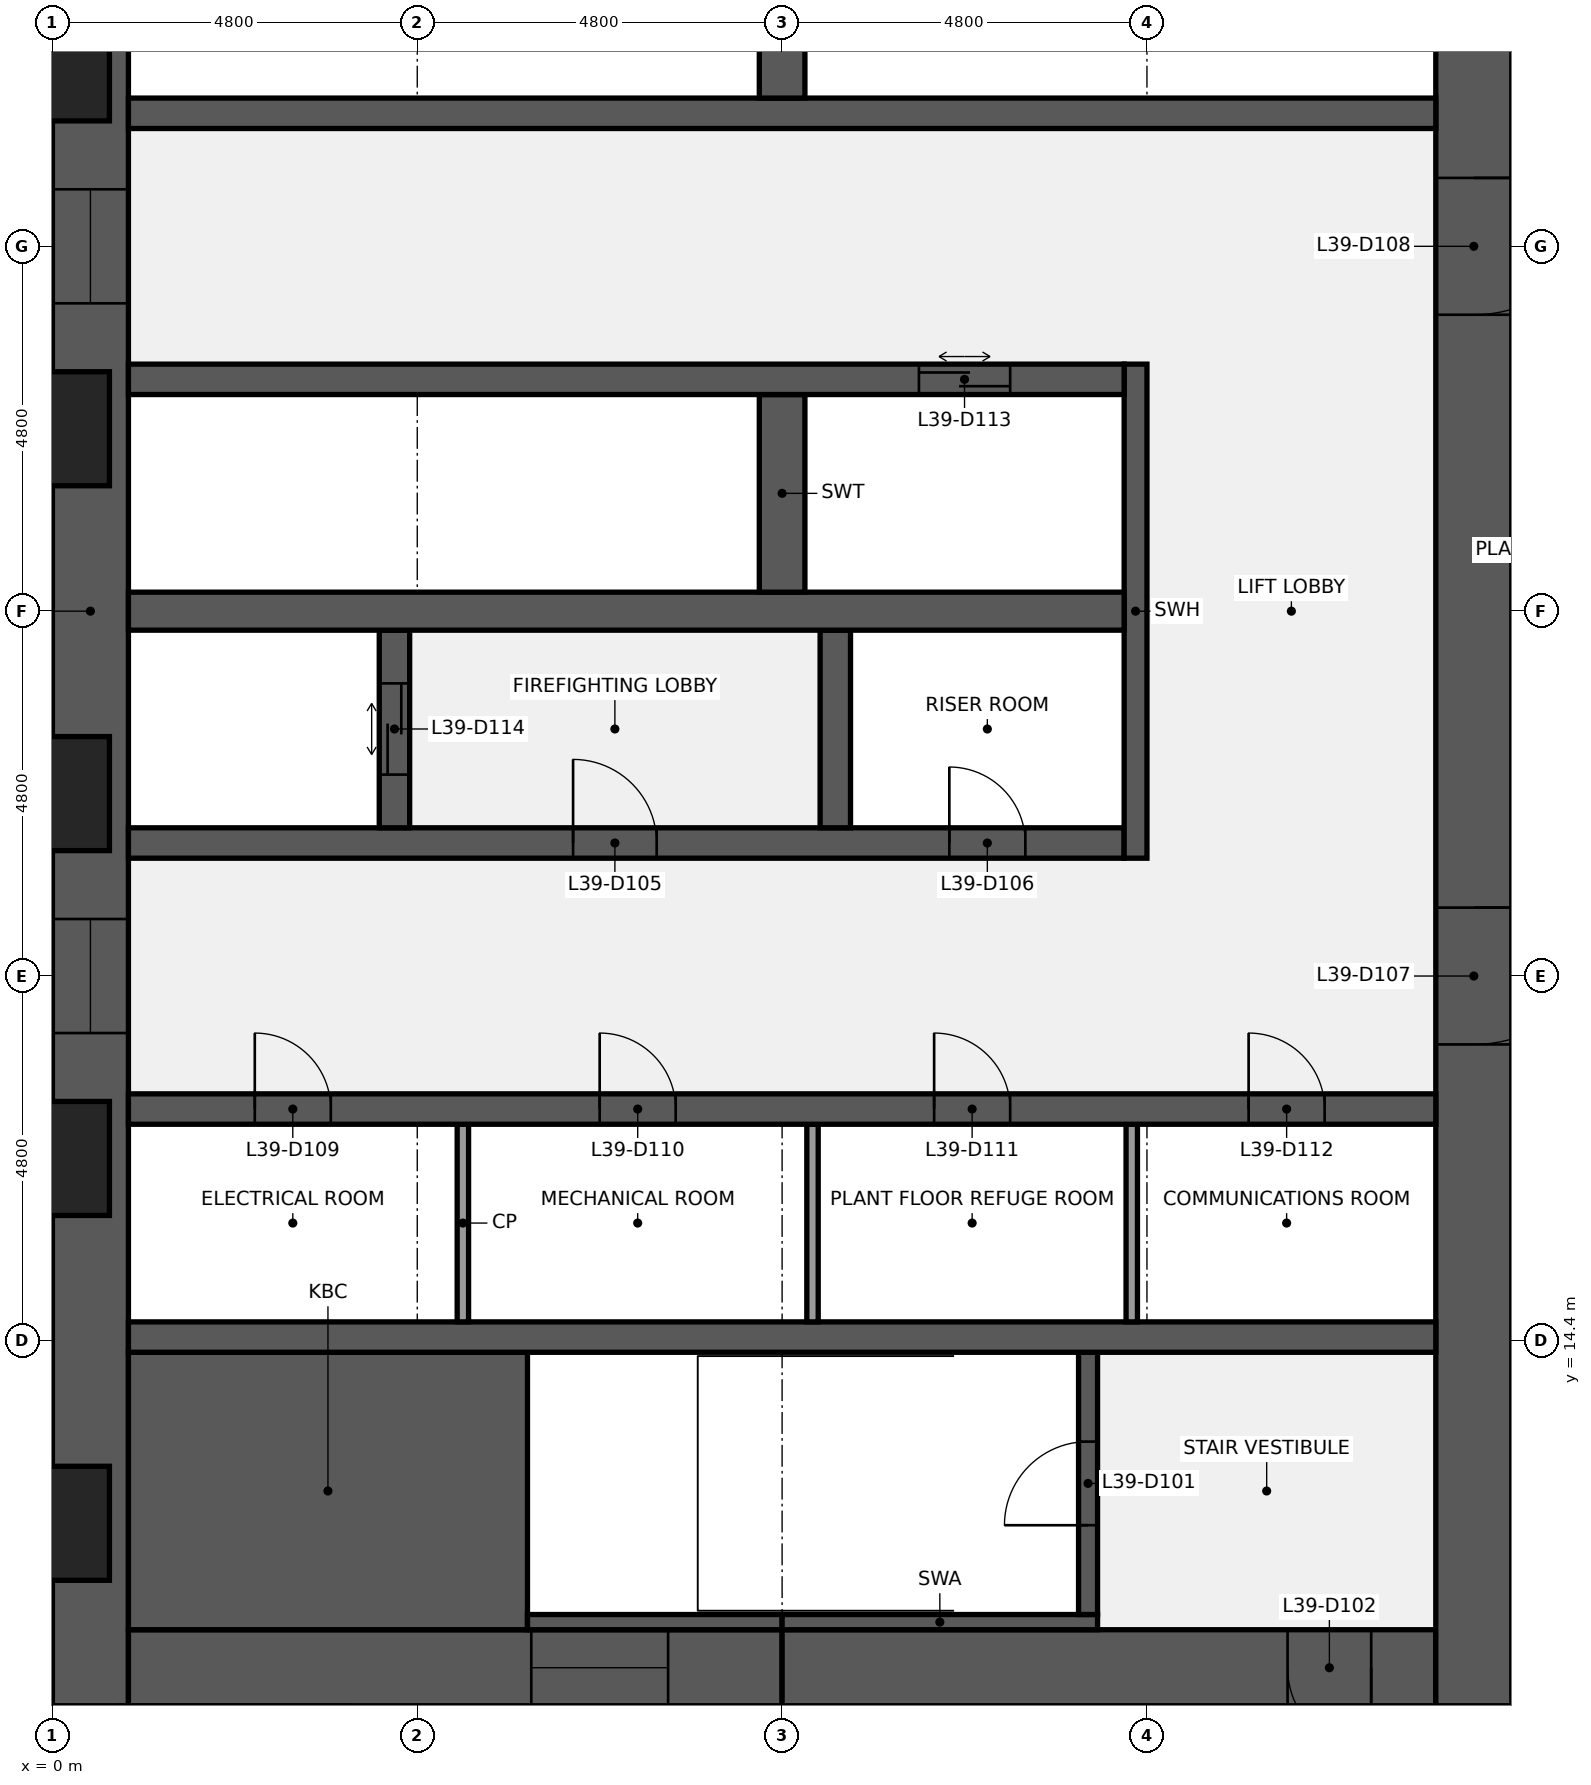
"""IFC4 building model, lengths in metres.
Left out: names, types, materials, properties, quantities, classifications, styles, units other than length and angle.
Written with IfcOpenShell. Run it as: python <this file> out.ifc"""

import sys

from ifc_helpers import new_model, si_unit, direction, frame, frame_2d, origin, place, context, subcontext, project, spatial, rectangle, extrude, element, fill, save


model = new_model("IFC4")
c1 = context("Model", 3, precision=1e-05, world=origin(), true_north=direction((0.0, 1.0)))
c2 = subcontext(c1, "Body", "Model", "MODEL_VIEW")
j1 = project(units=[si_unit("LENGTHUNIT", "METRE"), si_unit("PLANEANGLEUNIT", "RADIAN")], contexts=[c1])
p1 = place(None, origin())
s1 = spatial("IfcSite", under=j1, at=p1, CompositionType="ELEMENT")
p2 = place(p1, origin())
s2 = spatial("IfcBuilding", under=s1, at=p2, CompositionType="ELEMENT")
p3 = place(p2, frame((0.0, 0.0, 176.1)))
s3 = spatial("IfcBuildingStorey", under=s2, at=p3, CompositionType="ELEMENT", Elevation=176.1)
p4 = place(p3, frame((0.5, 9.6, 0.0), z_axis=(0.0, 0.0, 1.0), x_axis=(0.0, 1.0, 0.0)))
e1 = element("IfcWall", 1, at=p4, inside=s3, PredefinedType="SHEAR", context=c2, shape_type="SweptSolid", body=[
    extrude(rectangle(XDim=28.8, YDim=1.0, at=frame_2d((14.4, 0.0))), origin(), (0.0, 0.0, 1.0), 4.1),
])
p5 = place(p4, frame((8.85, 0.0, 0.9)))
e2 = element("IfcOpeningElement", 2, at=p5, cuts=e1, PredefinedType="OPENING", context=c2, shape_type="SweptSolid", body=[
    extrude(rectangle(XDim=1.5, YDim=1.5, at=frame_2d((0.75, 0.75))), frame((0.0, 0.51, 0.0), z_axis=(0.0, -1.0, 0.0), x_axis=(1.0, 0.0, 0.0)), (0.0, 0.0, 1.0), 1.02),
])
p6 = place(p4, frame((18.45, 0.0, 0.9)))
e3 = element("IfcOpeningElement", 3, at=p6, cuts=e1, PredefinedType="OPENING", context=c2, shape_type="SweptSolid", body=[
    extrude(rectangle(XDim=1.5, YDim=1.5, at=frame_2d((0.75, 0.75))), frame((0.0, 0.51, 0.0), z_axis=(0.0, -1.0, 0.0), x_axis=(1.0, 0.0, 0.0)), (0.0, 0.0, 1.0), 1.02),
])
p7 = place(p3, frame((9.6, 10.1, 0.0), z_axis=(0.0, 0.0, 1.0), x_axis=(-1.0, 0.0, 0.0)))
e4 = element("IfcWall", 4, at=p7, inside=s3, PredefinedType="SHEAR", context=c2, shape_type="SweptSolid", body=[
    extrude(rectangle(XDim=8.6, YDim=1.0, at=frame_2d((4.3, 0.0))), origin(), (0.0, 0.0, 1.0), 4.1),
])
p8 = place(p7, frame((1.5, 0.0, 0.9)))
e5 = element("IfcOpeningElement", 5, at=p8, cuts=e4, PredefinedType="OPENING", context=c2, shape_type="SweptSolid", body=[
    extrude(rectangle(XDim=1.8, YDim=1.5, at=frame_2d((0.9, 0.75))), frame((0.0, 0.51, 0.0), z_axis=(0.0, -1.0, 0.0), x_axis=(1.0, 0.0, 0.0)), (0.0, 0.0, 1.0), 1.02),
])
p9 = place(p3, frame((18.2, 10.1, 0.0), z_axis=(0.0, 0.0, 1.0), x_axis=(-1.0, 0.0, 0.0)))
e6 = element("IfcWall", 6, at=p9, inside=s3, PredefinedType="SHEAR", context=c2, shape_type="SweptSolid", body=[
    extrude(rectangle(XDim=8.6, YDim=1.0, at=frame_2d((4.3, 0.0))), origin(), (0.0, 0.0, 1.0), 4.1),
])
p10 = place(p9, frame((0.85, 0.0, 0.0)))
e7 = element("IfcOpeningElement", 7, at=p10, cuts=e6, PredefinedType="OPENING", context=c2, shape_type="SweptSolid", body=[
    extrude(rectangle(XDim=1.1, YDim=2.1, at=frame_2d((0.55, 1.05))), frame((0.0, 0.51, 0.0), z_axis=(0.0, -1.0, 0.0), x_axis=(1.0, 0.0, 0.0)), (0.0, 0.0, 1.0), 1.02),
])
p11 = place(p3, frame((18.7, 38.4, 0.0), z_axis=(0.0, 0.0, 1.0), x_axis=(0.0, -1.0, 0.0)))
e8 = element("IfcWall", 8, at=p11, inside=s3, PredefinedType="SHEAR", context=c2, shape_type="SweptSolid", body=[
    extrude(rectangle(XDim=28.8, YDim=1.0, at=frame_2d((14.4, 0.0))), origin(), (0.0, 0.0, 1.0), 4.1),
])
p12 = place(p11, frame((18.3, 0.0, 0.0)))
e9 = element("IfcOpeningElement", 9, at=p12, cuts=e8, PredefinedType="OPENING", context=c2, shape_type="SweptSolid", body=[
    extrude(rectangle(XDim=1.8, YDim=2.1, at=frame_2d((0.9, 1.05))), frame((0.0, 0.51, 0.0), z_axis=(0.0, -1.0, 0.0), x_axis=(1.0, 0.0, 0.0)), (0.0, 0.0, 1.0), 1.02),
])
p13 = place(p11, frame((8.7, 0.0, 0.0)))
e10 = element("IfcOpeningElement", 10, at=p13, cuts=e8, PredefinedType="OPENING", context=c2, shape_type="SweptSolid", body=[
    extrude(rectangle(XDim=1.8, YDim=2.1, at=frame_2d((0.9, 1.05))), frame((0.0, 0.51, 0.0), z_axis=(0.0, -1.0, 0.0), x_axis=(1.0, 0.0, 0.0)), (0.0, 0.0, 1.0), 1.02),
])
p14 = place(p3, frame((1.0, 12.425, 0.0), z_axis=(0.0, 0.0, 1.0), x_axis=(1.0, 0.0, 0.0)))
e11 = element("IfcWall", 11, at=p14, inside=s3, PredefinedType="SHEAR", context=c2, shape_type="SweptSolid", body=[
    extrude(rectangle(XDim=5.25, YDim=3.65, at=frame_2d((2.625, 0.0))), origin(), (0.0, 0.0, 1.0), 4.1),
])
p15 = place(p3, frame((6.25, 10.7, 0.0), z_axis=(0.0, 0.0, 1.0), x_axis=(1.0, 0.0, 0.0)))
e12 = element("IfcWall", 12, at=p15, inside=s3, PredefinedType="SHEAR", context=c2, shape_type="SweptSolid", body=[
    extrude(rectangle(XDim=3.35, YDim=0.2, at=frame_2d((1.675, 0.0))), origin(), (0.0, 0.0, 1.0), 4.1),
])
p16 = place(p3, frame((9.6, 10.7, 0.0), z_axis=(0.0, 0.0, 1.0), x_axis=(1.0, 0.0, 0.0)))
e13 = element("IfcWall", 13, at=p16, inside=s3, PredefinedType="SHEAR", context=c2, shape_type="SweptSolid", body=[
    extrude(rectangle(XDim=4.15, YDim=0.2, at=frame_2d((2.075, 0.0))), origin(), (0.0, 0.0, 1.0), 4.1),
])
p17 = place(p3, frame((13.625, 10.8, 0.0), z_axis=(0.0, 0.0, 1.0), x_axis=(0.0, 1.0, 0.0)))
e14 = element("IfcWall", 14, at=p17, inside=s3, PredefinedType="SHEAR", context=c2, shape_type="SweptSolid", body=[
    extrude(rectangle(XDim=3.45, YDim=0.25, at=frame_2d((1.725, 0.0))), origin(), (0.0, 0.0, 1.0), 4.1),
])
p18 = place(p17, frame((1.175, 0.0, 0.0)))
e15 = element("IfcOpeningElement", 15, at=p18, cuts=e14, PredefinedType="OPENING", context=c2, shape_type="SweptSolid", body=[
    extrude(rectangle(XDim=1.1, YDim=2.1, at=frame_2d((0.55, 1.05))), frame((0.0, 0.135, 0.0), z_axis=(0.0, -1.0, 0.0), x_axis=(1.0, 0.0, 0.0)), (0.0, 0.0, 1.0), 0.27),
])
p19 = place(p3, frame((1.0, 14.45, 0.0), z_axis=(0.0, 0.0, 1.0), x_axis=(1.0, 0.0, 0.0)))
e16 = element("IfcWall", 16, at=p19, inside=s3, PredefinedType="SHEAR", context=c2, shape_type="SweptSolid", body=[
    extrude(rectangle(XDim=17.2, YDim=0.4, at=frame_2d((8.6, 0.0))), origin(), (0.0, 0.0, 1.0), 4.1),
])
for number, where, z_axis, x_axis in (
    (17, (5.4, 14.65, 0.0), (0.0, 0.0, 1.0), (0.0, 1.0, 0.0)),
    (18, (10.0, 14.65, 0.0), (0.0, 0.0, 1.0), (0.0, 1.0, 0.0)),
    (19, (14.2, 14.65, 0.0), (0.0, 0.0, 1.0), (0.0, 1.0, 0.0)),
):
    element("IfcWall", number, at=place(p3, frame(where, z_axis=z_axis, x_axis=x_axis)), inside=s3, PredefinedType="PARTITIONING", context=c2, shape_type="SweptSolid", body=[
        extrude(rectangle(XDim=2.6, YDim=0.15, at=frame_2d((1.3, 0.0))), origin(), (0.0, 0.0, 1.0), 4.1),
    ])
p20 = place(p3, frame((1.0, 17.45, 0.0), z_axis=(0.0, 0.0, 1.0), x_axis=(1.0, 0.0, 0.0)))
e20 = element("IfcWall", 20, at=p20, inside=s3, PredefinedType="SHEAR", context=c2, shape_type="SweptSolid", body=[
    extrude(rectangle(XDim=17.2, YDim=0.4, at=frame_2d((8.6, 0.0))), origin(), (0.0, 0.0, 1.0), 4.1),
])
p21 = place(p20, frame((1.663, 0.0, 0.0)))
e21 = element("IfcOpeningElement", 21, at=p21, cuts=e20, PredefinedType="OPENING", context=c2, shape_type="SweptSolid", body=[
    extrude(rectangle(XDim=1.0, YDim=2.1, at=frame_2d((0.5, 1.05))), frame((0.0, 0.21, 0.0), z_axis=(0.0, -1.0, 0.0), x_axis=(1.0, 0.0, 0.0)), (0.0, 0.0, 1.0), 0.42),
])
p22 = place(p20, frame((6.2, 0.0, 0.0)))
e22 = element("IfcOpeningElement", 22, at=p22, cuts=e20, PredefinedType="OPENING", context=c2, shape_type="SweptSolid", body=[
    extrude(rectangle(XDim=1.0, YDim=2.1, at=frame_2d((0.5, 1.05))), frame((0.0, 0.21, 0.0), z_axis=(0.0, -1.0, 0.0), x_axis=(1.0, 0.0, 0.0)), (0.0, 0.0, 1.0), 0.42),
])
p23 = place(p20, frame((10.6, 0.0, 0.0)))
e23 = element("IfcOpeningElement", 23, at=p23, cuts=e20, PredefinedType="OPENING", context=c2, shape_type="SweptSolid", body=[
    extrude(rectangle(XDim=1.0, YDim=2.1, at=frame_2d((0.5, 1.05))), frame((0.0, 0.21, 0.0), z_axis=(0.0, -1.0, 0.0), x_axis=(1.0, 0.0, 0.0)), (0.0, 0.0, 1.0), 0.42),
])
p24 = place(p20, frame((14.738, 0.0, 0.0)))
e24 = element("IfcOpeningElement", 24, at=p24, cuts=e20, PredefinedType="OPENING", context=c2, shape_type="SweptSolid", body=[
    extrude(rectangle(XDim=1.0, YDim=2.1, at=frame_2d((0.5, 1.05))), frame((0.0, 0.21, 0.0), z_axis=(0.0, -1.0, 0.0), x_axis=(1.0, 0.0, 0.0)), (0.0, 0.0, 1.0), 0.42),
])
p25 = place(p3, frame((1.0, 20.95, 0.0), z_axis=(0.0, 0.0, 1.0), x_axis=(1.0, 0.0, 0.0)))
e25 = element("IfcWall", 25, at=p25, inside=s3, PredefinedType="SHEAR", context=c2, shape_type="SweptSolid", body=[
    extrude(rectangle(XDim=13.1, YDim=0.4, at=frame_2d((6.55, 0.0))), origin(), (0.0, 0.0, 1.0), 4.1),
])
p26 = place(p25, frame((5.85, 0.0, 0.0)))
e26 = element("IfcOpeningElement", 26, at=p26, cuts=e25, PredefinedType="OPENING", context=c2, shape_type="SweptSolid", body=[
    extrude(rectangle(XDim=1.1, YDim=2.1, at=frame_2d((0.55, 1.05))), frame((0.0, 0.21, 0.0), z_axis=(0.0, -1.0, 0.0), x_axis=(1.0, 0.0, 0.0)), (0.0, 0.0, 1.0), 0.42),
])
p27 = place(p25, frame((10.8, 0.0, 0.0)))
e27 = element("IfcOpeningElement", 27, at=p27, cuts=e25, PredefinedType="OPENING", context=c2, shape_type="SweptSolid", body=[
    extrude(rectangle(XDim=1.0, YDim=2.1, at=frame_2d((0.5, 1.05))), frame((0.0, 0.21, 0.0), z_axis=(0.0, -1.0, 0.0), x_axis=(1.0, 0.0, 0.0)), (0.0, 0.0, 1.0), 0.42),
])
p28 = place(p3, frame((14.25, 20.75, 0.0), z_axis=(0.0, 0.0, 1.0), x_axis=(0.0, 1.0, 0.0)))
e28 = element("IfcWall", 28, at=p28, inside=s3, PredefinedType="SHEAR", context=c2, shape_type="SweptSolid", body=[
    extrude(rectangle(XDim=6.5, YDim=0.3, at=frame_2d((3.25, 0.0))), origin(), (0.0, 0.0, 1.0), 4.1),
])
p29 = place(p3, frame((4.5, 21.15, 0.0), z_axis=(0.0, 0.0, 1.0), x_axis=(0.0, 1.0, 0.0)))
e29 = element("IfcWall", 29, at=p29, inside=s3, PredefinedType="SHEAR", context=c2, shape_type="SweptSolid", body=[
    extrude(rectangle(XDim=2.6, YDim=0.4, at=frame_2d((1.3, 0.0))), origin(), (0.0, 0.0, 1.0), 4.1),
])
p30 = place(p29, frame((0.7, 0.0, 0.0)))
e30 = element("IfcOpeningElement", 30, at=p30, cuts=e29, PredefinedType="OPENING", context=c2, shape_type="SweptSolid", body=[
    extrude(rectangle(XDim=1.2, YDim=2.1, at=frame_2d((0.6, 1.05))), frame((0.0, 0.21, 0.0), z_axis=(0.0, -1.0, 0.0), x_axis=(1.0, 0.0, 0.0)), (0.0, 0.0, 1.0), 0.42),
])
p31 = place(p3, frame((10.3, 21.15, 0.0), z_axis=(0.0, 0.0, 1.0), x_axis=(0.0, 1.0, 0.0)))
e31 = element("IfcWall", 31, at=p31, inside=s3, PredefinedType="SHEAR", context=c2, shape_type="SweptSolid", body=[
    extrude(rectangle(XDim=2.6, YDim=0.4, at=frame_2d((1.3, 0.0))), origin(), (0.0, 0.0, 1.0), 4.1),
])
p32 = place(p3, frame((1.0, 24.0, 0.0), z_axis=(0.0, 0.0, 1.0), x_axis=(1.0, 0.0, 0.0)))
e32 = element("IfcWall", 32, at=p32, inside=s3, PredefinedType="SHEAR", context=c2, shape_type="SweptSolid", body=[
    extrude(rectangle(XDim=13.1, YDim=0.5, at=frame_2d((6.55, 0.0))), origin(), (0.0, 0.0, 1.0), 4.1),
])
p33 = place(p3, frame((9.6, 24.25, 0.0), z_axis=(0.0, 0.0, 1.0), x_axis=(0.0, 1.0, 0.0)))
e33 = element("IfcWall", 33, at=p33, inside=s3, PredefinedType="SHEAR", context=c2, shape_type="SweptSolid", body=[
    extrude(rectangle(XDim=2.6, YDim=0.6, at=frame_2d((1.3, 0.0))), origin(), (0.0, 0.0, 1.0), 4.1),
])
p34 = place(p3, frame((1.0, 27.05, 0.0), z_axis=(0.0, 0.0, 1.0), x_axis=(1.0, 0.0, 0.0)))
e34 = element("IfcWall", 34, at=p34, inside=s3, PredefinedType="SHEAR", context=c2, shape_type="SweptSolid", body=[
    extrude(rectangle(XDim=13.1, YDim=0.4, at=frame_2d((6.55, 0.0))), origin(), (0.0, 0.0, 1.0), 4.1),
])
p35 = place(p34, frame((10.4, 0.0, 0.0)))
e35 = element("IfcOpeningElement", 35, at=p35, cuts=e34, PredefinedType="OPENING", context=c2, shape_type="SweptSolid", body=[
    extrude(rectangle(XDim=1.2, YDim=2.1, at=frame_2d((0.6, 1.05))), frame((0.0, 0.21, 0.0), z_axis=(0.0, -1.0, 0.0), x_axis=(1.0, 0.0, 0.0)), (0.0, 0.0, 1.0), 0.42),
])
p36 = place(p3, frame((1.0, 30.55, 0.0), z_axis=(0.0, 0.0, 1.0), x_axis=(1.0, 0.0, 0.0)))
e36 = element("IfcWall", 36, at=p36, inside=s3, PredefinedType="SHEAR", context=c2, shape_type="SweptSolid", body=[
    extrude(rectangle(XDim=17.2, YDim=0.4, at=frame_2d((8.6, 0.0))), origin(), (0.0, 0.0, 1.0), 4.1),
])
p37 = place(p3, frame((9.6, 30.75, 0.0), z_axis=(0.0, 0.0, 1.0), x_axis=(0.0, 1.0, 0.0)))
e37 = element("IfcWall", 37, at=p37, inside=s3, PredefinedType="SHEAR", context=c2, shape_type="SweptSolid", body=[
    extrude(rectangle(XDim=2.6, YDim=0.6, at=frame_2d((1.3, 0.0))), origin(), (0.0, 0.0, 1.0), 4.1),
])
p38 = place(p18, origin())
e38 = element("IfcDoor", 38, at=p38, inside=s3, OperationType="SINGLE_SWING_LEFT", PredefinedType="DOOR", context=c2, shape_type="SweptSolid", body=[
    extrude(rectangle(XDim=1.1, YDim=2.1, at=frame_2d((0.55, 1.05))), frame((0.0, 0.025, 0.0), z_axis=(0.0, -1.0, 0.0), x_axis=(1.0, 0.0, 0.0)), (0.0, 0.0, 1.0), 0.05),
])
fill(e15, e38)
p39 = place(p10, origin())
e39 = element("IfcDoor", 39, at=p39, inside=s3, OperationType="SINGLE_SWING_LEFT", PredefinedType="DOOR", context=c2, shape_type="SweptSolid", body=[
    extrude(rectangle(XDim=1.1, YDim=2.1, at=frame_2d((0.55, 1.05))), frame((0.0, 0.025, 0.0), z_axis=(0.0, -1.0, 0.0), x_axis=(1.0, 0.0, 0.0)), (0.0, 0.0, 1.0), 0.05),
])
fill(e7, e39)
p40 = place(p26, origin())
e40 = element("IfcDoor", 40, at=p40, inside=s3, OperationType="SINGLE_SWING_LEFT", PredefinedType="DOOR", context=c2, shape_type="SweptSolid", body=[
    extrude(rectangle(XDim=1.1, YDim=2.1, at=frame_2d((0.55, 1.05))), frame((0.0, 0.025, 0.0), z_axis=(0.0, -1.0, 0.0), x_axis=(1.0, 0.0, 0.0)), (0.0, 0.0, 1.0), 0.05),
])
fill(e26, e40)
p41 = place(p27, origin())
e41 = element("IfcDoor", 41, at=p41, inside=s3, OperationType="SINGLE_SWING_LEFT", PredefinedType="DOOR", context=c2, shape_type="SweptSolid", body=[
    extrude(rectangle(XDim=1.0, YDim=2.1, at=frame_2d((0.5, 1.05))), frame((0.0, 0.025, 0.0), z_axis=(0.0, -1.0, 0.0), x_axis=(1.0, 0.0, 0.0)), (0.0, 0.0, 1.0), 0.05),
])
fill(e27, e41)
p42 = place(p12, origin())
e42 = element("IfcDoor", 42, at=p42, inside=s3, OperationType="DOUBLE_DOOR_SINGLE_SWING", PredefinedType="DOOR", context=c2, shape_type="SweptSolid", body=[
    extrude(rectangle(XDim=1.8, YDim=2.1, at=frame_2d((0.9, 1.05))), frame((0.0, 0.025, 0.0), z_axis=(0.0, -1.0, 0.0), x_axis=(1.0, 0.0, 0.0)), (0.0, 0.0, 1.0), 0.05),
])
fill(e9, e42)
p43 = place(p13, origin())
e43 = element("IfcDoor", 43, at=p43, inside=s3, OperationType="DOUBLE_DOOR_SINGLE_SWING", PredefinedType="DOOR", context=c2, shape_type="SweptSolid", body=[
    extrude(rectangle(XDim=1.8, YDim=2.1, at=frame_2d((0.9, 1.05))), frame((0.0, 0.025, 0.0), z_axis=(0.0, -1.0, 0.0), x_axis=(1.0, 0.0, 0.0)), (0.0, 0.0, 1.0), 0.05),
])
fill(e10, e43)
p44 = place(p21, origin())
e44 = element("IfcDoor", 44, at=p44, inside=s3, OperationType="SINGLE_SWING_LEFT", PredefinedType="DOOR", context=c2, shape_type="SweptSolid", body=[
    extrude(rectangle(XDim=1.0, YDim=2.1, at=frame_2d((0.5, 1.05))), frame((0.0, 0.025, 0.0), z_axis=(0.0, -1.0, 0.0), x_axis=(1.0, 0.0, 0.0)), (0.0, 0.0, 1.0), 0.05),
])
fill(e21, e44)
p45 = place(p22, origin())
e45 = element("IfcDoor", 45, at=p45, inside=s3, OperationType="SINGLE_SWING_LEFT", PredefinedType="DOOR", context=c2, shape_type="SweptSolid", body=[
    extrude(rectangle(XDim=1.0, YDim=2.1, at=frame_2d((0.5, 1.05))), frame((0.0, 0.025, 0.0), z_axis=(0.0, -1.0, 0.0), x_axis=(1.0, 0.0, 0.0)), (0.0, 0.0, 1.0), 0.05),
])
fill(e22, e45)
p46 = place(p23, origin())
e46 = element("IfcDoor", 46, at=p46, inside=s3, OperationType="SINGLE_SWING_LEFT", PredefinedType="DOOR", context=c2, shape_type="SweptSolid", body=[
    extrude(rectangle(XDim=1.0, YDim=2.1, at=frame_2d((0.5, 1.05))), frame((0.0, 0.025, 0.0), z_axis=(0.0, -1.0, 0.0), x_axis=(1.0, 0.0, 0.0)), (0.0, 0.0, 1.0), 0.05),
])
fill(e23, e46)
p47 = place(p24, origin())
e47 = element("IfcDoor", 47, at=p47, inside=s3, OperationType="SINGLE_SWING_LEFT", PredefinedType="DOOR", context=c2, shape_type="SweptSolid", body=[
    extrude(rectangle(XDim=1.0, YDim=2.1, at=frame_2d((0.5, 1.05))), frame((0.0, 0.025, 0.0), z_axis=(0.0, -1.0, 0.0), x_axis=(1.0, 0.0, 0.0)), (0.0, 0.0, 1.0), 0.05),
])
fill(e24, e47)
p48 = place(p35, origin())
e48 = element("IfcDoor", 48, at=p48, inside=s3, OperationType="DOUBLE_DOOR_SLIDING", PredefinedType="DOOR", context=c2, shape_type="SweptSolid", body=[
    extrude(rectangle(XDim=1.2, YDim=2.1, at=frame_2d((0.6, 1.05))), frame((0.0, 0.025, 0.0), z_axis=(0.0, -1.0, 0.0), x_axis=(1.0, 0.0, 0.0)), (0.0, 0.0, 1.0), 0.05),
])
fill(e35, e48)
p49 = place(p30, origin())
e49 = element("IfcDoor", 49, at=p49, inside=s3, OperationType="DOUBLE_DOOR_SLIDING", PredefinedType="DOOR", context=c2, shape_type="SweptSolid", body=[
    extrude(rectangle(XDim=1.2, YDim=2.1, at=frame_2d((0.6, 1.05))), frame((0.0, 0.025, 0.0), z_axis=(0.0, -1.0, 0.0), x_axis=(1.0, 0.0, 0.0)), (0.0, 0.0, 1.0), 0.05),
])
fill(e30, e49)
p50 = place(p5, origin())
e50 = element("IfcWindow", 50, at=p50, inside=s3, PartitioningType="SINGLE_PANEL", PredefinedType="WINDOW", context=c2, shape_type="SweptSolid", body=[
    extrude(rectangle(XDim=1.5, YDim=1.5, at=frame_2d((0.75, 0.75))), frame((0.0, 0.03, 0.0), z_axis=(0.0, -1.0, 0.0), x_axis=(1.0, 0.0, 0.0)), (0.0, 0.0, 1.0), 0.06),
])
fill(e2, e50)
p51 = place(p6, origin())
e51 = element("IfcWindow", 51, at=p51, inside=s3, PartitioningType="SINGLE_PANEL", PredefinedType="WINDOW", context=c2, shape_type="SweptSolid", body=[
    extrude(rectangle(XDim=1.5, YDim=1.5, at=frame_2d((0.75, 0.75))), frame((0.0, 0.03, 0.0), z_axis=(0.0, -1.0, 0.0), x_axis=(1.0, 0.0, 0.0)), (0.0, 0.0, 1.0), 0.06),
])
fill(e3, e51)
p52 = place(p8, origin())
e52 = element("IfcWindow", 52, at=p52, inside=s3, PartitioningType="SINGLE_PANEL", PredefinedType="WINDOW", context=c2, shape_type="SweptSolid", body=[
    extrude(rectangle(XDim=1.8, YDim=1.5, at=frame_2d((0.9, 0.75))), frame((0.0, 0.03, 0.0), z_axis=(0.0, -1.0, 0.0), x_axis=(1.0, 0.0, 0.0)), (0.0, 0.0, 1.0), 0.06),
])
fill(e5, e52)
save(model, sys.argv[1])
